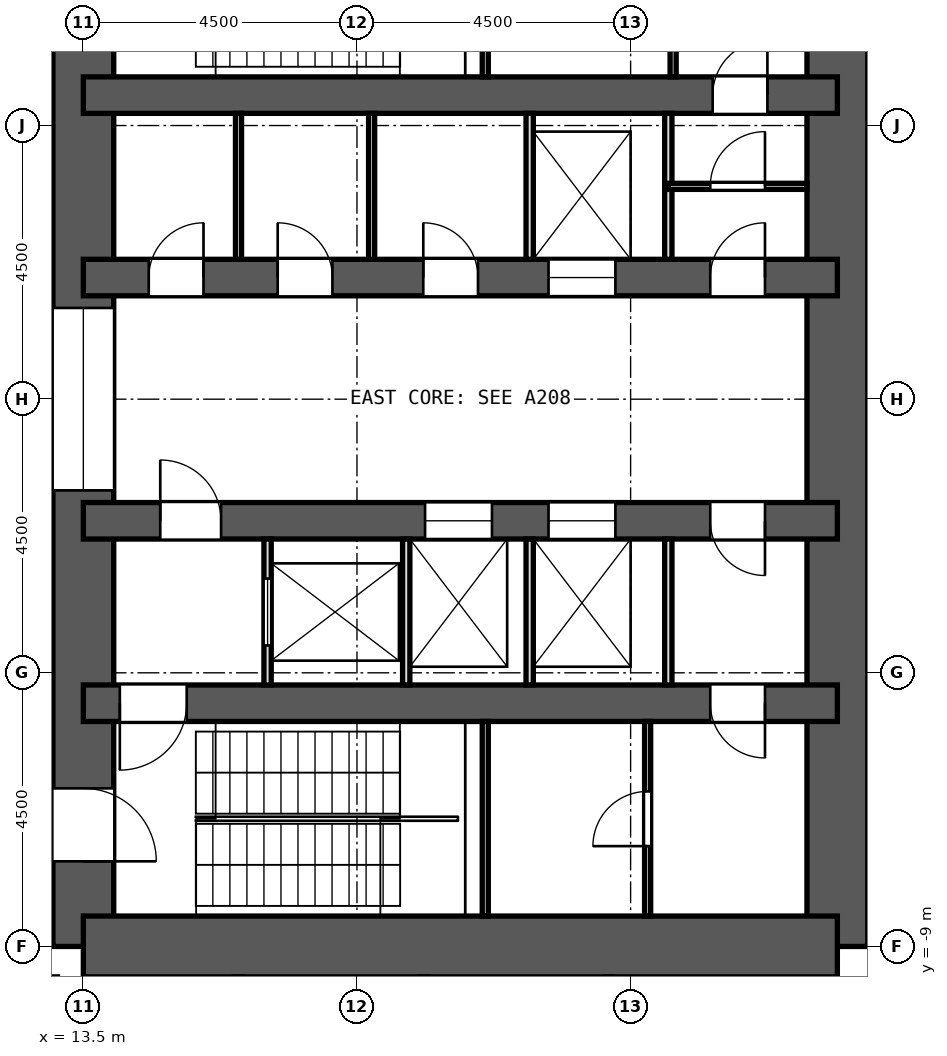
"""IFC4 building model, lengths in metres.
Left out: names, types, materials, properties, quantities, classifications, styles, units other than length and angle.
Written with IfcOpenShell. Run it as: python <this file> out.ifc"""

import sys

from ifc_helpers import new_model, si_unit, direction, frame, frame_2d, origin, place, context, subcontext, project, spatial, rectangle, extrude, element, fill, save


model = new_model("IFC4")
c1 = context("Model", 3, precision=1e-05, world=origin(), true_north=direction((0.0, 1.0)))
c2 = subcontext(c1, "Body", "Model", "MODEL_VIEW")
j1 = project(units=[si_unit("LENGTHUNIT", "METRE"), si_unit("PLANEANGLEUNIT", "RADIAN")], contexts=[c1])
p1 = place(None, origin())
s1 = spatial("IfcSite", under=j1, at=p1, CompositionType="ELEMENT")
p2 = place(p1, origin())
s2 = spatial("IfcBuilding", under=s1, at=p2, CompositionType="ELEMENT")
p3 = place(p2, frame((0.0, 0.0, 21.8)))
s3 = spatial("IfcBuildingStorey", under=s2, at=p3, CompositionType="ELEMENT", Elevation=21.8)
p4 = place(p3, frame((13.5, -9.0, 0.0), z_axis=(0.0, 0.0, 1.0), x_axis=(0.0, 1.0, 0.0)))
e1 = element("IfcWall", 1, at=p4, inside=s3, PredefinedType="SHEAR", context=c2, shape_type="SweptSolid", body=[
    extrude(rectangle(XDim=18.0, YDim=1.0, at=frame_2d((9.0, 0.0))), origin(), (0.0, 0.0, 1.0), 4.5),
])
p5 = place(p4, frame((15.4, 0.0, 0.0)))
e2 = element("IfcOpeningElement", 2, at=p5, cuts=e1, PredefinedType="OPENING", context=c2, shape_type="SweptSolid", body=[
    extrude(rectangle(XDim=1.2, YDim=2.1, at=frame_2d((0.6, 1.05))), frame((0.0, 0.512, 0.0), z_axis=(0.0, -1.0, 0.0), x_axis=(1.0, 0.0, 0.0)), (0.0, 0.0, 1.0), 1.024),
])
p6 = place(p4, frame((1.4, 0.0, 0.0)))
e3 = element("IfcOpeningElement", 3, at=p6, cuts=e1, PredefinedType="OPENING", context=c2, shape_type="SweptSolid", body=[
    extrude(rectangle(XDim=1.2, YDim=2.1, at=frame_2d((0.6, 1.05))), frame((0.0, 0.512, 0.0), z_axis=(0.0, -1.0, 0.0), x_axis=(1.0, 0.0, 0.0)), (0.0, 0.0, 1.0), 1.024),
])
p7 = place(p4, frame((7.5, 0.0, 0.0)))
e4 = element("IfcOpeningElement", 4, at=p7, cuts=e1, PredefinedType="OPENING", context=c2, shape_type="SweptSolid", body=[
    extrude(rectangle(XDim=3.0, YDim=2.4, at=frame_2d((1.5, 1.2))), frame((0.0, 0.512, 0.0), z_axis=(0.0, -1.0, 0.0), x_axis=(1.0, 0.0, 0.0)), (0.0, 0.0, 1.0), 1.024),
])
p8 = place(p3, frame((25.9, -9.0, 0.0), z_axis=(0.0, 0.0, 1.0), x_axis=(0.0, 1.0, 0.0)))
e5 = element("IfcWall", 5, at=p8, inside=s3, PredefinedType="SHEAR", context=c2, shape_type="SweptSolid", body=[
    extrude(rectangle(XDim=18.0, YDim=1.0, at=frame_2d((9.0, 0.0))), origin(), (0.0, 0.0, 1.0), 4.5),
])
p9 = place(p3, frame((13.5, -9.0, 0.0), z_axis=(0.0, 0.0, 1.0), x_axis=(1.0, 0.0, 0.0)))
e6 = element("IfcWall", 6, at=p9, inside=s3, PredefinedType="SHEAR", context=c2, shape_type="SweptSolid", body=[
    extrude(rectangle(XDim=12.4, YDim=1.0, at=frame_2d((6.2, 0.0))), origin(), (0.0, 0.0, 1.0), 4.5),
])
p10 = place(p3, frame((13.5, 5.0, 0.0), z_axis=(0.0, 0.0, 1.0), x_axis=(1.0, 0.0, 0.0)))
e7 = element("IfcWall", 7, at=p10, inside=s3, PredefinedType="SHEAR", context=c2, shape_type="SweptSolid", body=[
    extrude(rectangle(XDim=12.4, YDim=0.6, at=frame_2d((6.2, 0.0))), origin(), (0.0, 0.0, 1.0), 4.5),
])
p11 = place(p10, frame((10.35, 0.0, 0.0)))
e8 = element("IfcOpeningElement", 8, at=p11, cuts=e7, PredefinedType="OPENING", context=c2, shape_type="SweptSolid", body=[
    extrude(rectangle(XDim=0.9, YDim=2.1, at=frame_2d((0.45, 1.05))), frame((0.0, 0.312, 0.0), z_axis=(0.0, -1.0, 0.0), x_axis=(1.0, 0.0, 0.0)), (0.0, 0.0, 1.0), 0.624),
])
p12 = place(p3, frame((13.5, -5.0, 0.0), z_axis=(0.0, 0.0, 1.0), x_axis=(1.0, 0.0, 0.0)))
e9 = element("IfcWall", 9, at=p12, inside=s3, PredefinedType="SHEAR", context=c2, shape_type="SweptSolid", body=[
    extrude(rectangle(XDim=12.4, YDim=0.6, at=frame_2d((6.2, 0.0))), origin(), (0.0, 0.0, 1.0), 4.5),
])
p13 = place(p12, frame((10.31, 0.0, 0.0)))
e10 = element("IfcOpeningElement", 10, at=p13, cuts=e9, PredefinedType="OPENING", context=c2, shape_type="SweptSolid", body=[
    extrude(rectangle(XDim=0.9, YDim=2.1, at=frame_2d((0.45, 1.05))), frame((0.0, 0.312, 0.0), z_axis=(0.0, -1.0, 0.0), x_axis=(1.0, 0.0, 0.0)), (0.0, 0.0, 1.0), 0.624),
])
p14 = place(p12, frame((0.6, 0.0, 0.0)))
e11 = element("IfcOpeningElement", 11, at=p14, cuts=e9, PredefinedType="OPENING", context=c2, shape_type="SweptSolid", body=[
    extrude(rectangle(XDim=1.1, YDim=2.1, at=frame_2d((0.55, 1.05))), frame((0.0, 0.312, 0.0), z_axis=(0.0, -1.0, 0.0), x_axis=(1.0, 0.0, 0.0)), (0.0, 0.0, 1.0), 0.624),
])
p15 = place(p3, frame((13.5, 2.0, 0.0), z_axis=(0.0, 0.0, 1.0), x_axis=(1.0, 0.0, 0.0)))
e12 = element("IfcWall", 12, at=p15, inside=s3, PredefinedType="SHEAR", context=c2, shape_type="SweptSolid", body=[
    extrude(rectangle(XDim=12.4, YDim=0.6, at=frame_2d((6.2, 0.0))), origin(), (0.0, 0.0, 1.0), 4.5),
])
p16 = place(p15, frame((7.65, 0.0, 0.0)))
e13 = element("IfcOpeningElement", 13, at=p16, cuts=e12, PredefinedType="OPENING", context=c2, shape_type="SweptSolid", body=[
    extrude(rectangle(XDim=1.1, YDim=2.1, at=frame_2d((0.55, 1.05))), frame((0.0, 0.312, 0.0), z_axis=(0.0, -1.0, 0.0), x_axis=(1.0, 0.0, 0.0)), (0.0, 0.0, 1.0), 0.624),
])
p17 = place(p15, frame((1.076, 0.0, 0.0)))
e14 = element("IfcOpeningElement", 14, at=p17, cuts=e12, PredefinedType="OPENING", context=c2, shape_type="SweptSolid", body=[
    extrude(rectangle(XDim=0.9, YDim=2.1, at=frame_2d((0.45, 1.05))), frame((0.0, 0.312, 0.0), z_axis=(0.0, -1.0, 0.0), x_axis=(1.0, 0.0, 0.0)), (0.0, 0.0, 1.0), 0.624),
])
p18 = place(p15, frame((3.196, 0.0, 0.0)))
e15 = element("IfcOpeningElement", 15, at=p18, cuts=e12, PredefinedType="OPENING", context=c2, shape_type="SweptSolid", body=[
    extrude(rectangle(XDim=0.9, YDim=2.1, at=frame_2d((0.45, 1.05))), frame((0.0, 0.312, 0.0), z_axis=(0.0, -1.0, 0.0), x_axis=(1.0, 0.0, 0.0)), (0.0, 0.0, 1.0), 0.624),
])
p19 = place(p15, frame((5.59, 0.0, 0.0)))
e16 = element("IfcOpeningElement", 16, at=p19, cuts=e12, PredefinedType="OPENING", context=c2, shape_type="SweptSolid", body=[
    extrude(rectangle(XDim=0.9, YDim=2.1, at=frame_2d((0.45, 1.05))), frame((0.0, 0.312, 0.0), z_axis=(0.0, -1.0, 0.0), x_axis=(1.0, 0.0, 0.0)), (0.0, 0.0, 1.0), 0.624),
])
p20 = place(p15, frame((10.31, 0.0, 0.0)))
e17 = element("IfcOpeningElement", 17, at=p20, cuts=e12, PredefinedType="OPENING", context=c2, shape_type="SweptSolid", body=[
    extrude(rectangle(XDim=0.9, YDim=2.1, at=frame_2d((0.45, 1.05))), frame((0.0, 0.312, 0.0), z_axis=(0.0, -1.0, 0.0), x_axis=(1.0, 0.0, 0.0)), (0.0, 0.0, 1.0), 0.624),
])
p21 = place(p3, frame((13.5, -2.0, 0.0), z_axis=(0.0, 0.0, 1.0), x_axis=(1.0, 0.0, 0.0)))
e18 = element("IfcWall", 18, at=p21, inside=s3, PredefinedType="SHEAR", context=c2, shape_type="SweptSolid", body=[
    extrude(rectangle(XDim=12.4, YDim=0.6, at=frame_2d((6.2, 0.0))), origin(), (0.0, 0.0, 1.0), 4.5),
])
p22 = place(p21, frame((5.62, 0.0, 0.0)))
e19 = element("IfcOpeningElement", 19, at=p22, cuts=e18, PredefinedType="OPENING", context=c2, shape_type="SweptSolid", body=[
    extrude(rectangle(XDim=1.1, YDim=2.1, at=frame_2d((0.55, 1.05))), frame((0.0, 0.312, 0.0), z_axis=(0.0, -1.0, 0.0), x_axis=(1.0, 0.0, 0.0)), (0.0, 0.0, 1.0), 0.624),
])
p23 = place(p21, frame((7.65, 0.0, 0.0)))
e20 = element("IfcOpeningElement", 20, at=p23, cuts=e18, PredefinedType="OPENING", context=c2, shape_type="SweptSolid", body=[
    extrude(rectangle(XDim=1.1, YDim=2.1, at=frame_2d((0.55, 1.05))), frame((0.0, 0.312, 0.0), z_axis=(0.0, -1.0, 0.0), x_axis=(1.0, 0.0, 0.0)), (0.0, 0.0, 1.0), 0.624),
])
p24 = place(p21, frame((1.265, 0.0, 0.0)))
e21 = element("IfcOpeningElement", 21, at=p24, cuts=e18, PredefinedType="OPENING", context=c2, shape_type="SweptSolid", body=[
    extrude(rectangle(XDim=1.0, YDim=2.1, at=frame_2d((0.5, 1.05))), frame((0.0, 0.312, 0.0), z_axis=(0.0, -1.0, 0.0), x_axis=(1.0, 0.0, 0.0)), (0.0, 0.0, 1.0), 0.624),
])
p25 = place(p21, frame((10.31, 0.0, 0.0)))
e22 = element("IfcOpeningElement", 22, at=p25, cuts=e18, PredefinedType="OPENING", context=c2, shape_type="SweptSolid", body=[
    extrude(rectangle(XDim=0.9, YDim=2.1, at=frame_2d((0.45, 1.05))), frame((0.0, 0.312, 0.0), z_axis=(0.0, -1.0, 0.0), x_axis=(1.0, 0.0, 0.0)), (0.0, 0.0, 1.0), 0.624),
])
p26 = place(p3, frame((26.328, -11.255, 0.0), z_axis=(0.0, 0.0, 1.0), x_axis=(0.342034744565, 0.939687306241, 0.0)))
e23 = element("IfcWall", 23, at=p26, inside=s3, PredefinedType="SOLIDWALL", context=c2, shape_type="SweptSolid", body=[
    extrude(rectangle(XDim=4.099, YDim=0.6, at=frame_2d((2.05, 0.0))), origin(), (0.0, 0.0, 1.0), 2.15),
])
for number, where, z_axis, x_axis in (
    (24, (16.052, 2.3, 0.0), (0.0, 0.0, 1.0), (0.0, 1.0, 0.0)),
    (25, (18.241, 2.3, 0.0), (0.0, 0.0, 1.0), (0.0, 1.0, 0.0)),
):
    element("IfcWall", number, at=place(p3, frame(where, z_axis=z_axis, x_axis=x_axis)), inside=s3, PredefinedType="PARTITIONING", context=c2, shape_type="SweptSolid", body=[
        extrude(rectangle(XDim=2.4, YDim=0.1, at=frame_2d((1.2, 0.0))), origin(), (0.0, 0.0, 1.0), 3.95),
    ])
for number, where, z_axis, x_axis in (
    (26, (20.84, 2.3, 0.0), (0.0, 0.0, 1.0), (0.0, 1.0, 0.0)),
    (27, (23.12, 2.3, 0.0), (0.0, 0.0, 1.0), (0.0, 1.0, 0.0)),
):
    element("IfcWall", number, at=place(p3, frame(where, z_axis=z_axis, x_axis=x_axis)), inside=s3, PredefinedType="PARTITIONING", context=c2, shape_type="SweptSolid", body=[
        extrude(rectangle(XDim=2.4, YDim=0.12, at=frame_2d((1.2, 0.0))), origin(), (0.0, 0.0, 1.0), 3.95),
    ])
p27 = place(p3, frame((16.53, -4.7, 0.0), z_axis=(0.0, 0.0, 1.0), x_axis=(0.0, 1.0, 0.0)))
e28 = element("IfcWall", 28, at=p27, inside=s3, PredefinedType="PARTITIONING", context=c2, shape_type="SweptSolid", body=[
    extrude(rectangle(XDim=2.4, YDim=0.12, at=frame_2d((1.2, 0.0))), origin(), (0.0, 0.0, 1.0), 3.95),
])
p28 = place(p27, frame((0.65, 0.0, 0.0)))
e29 = element("IfcOpeningElement", 29, at=p28, cuts=e28, PredefinedType="OPENING", context=c2, shape_type="SweptSolid", body=[
    extrude(rectangle(XDim=1.1, YDim=2.1, at=frame_2d((0.55, 1.05))), frame((0.0, 0.072, 0.0), z_axis=(0.0, -1.0, 0.0), x_axis=(1.0, 0.0, 0.0)), (0.0, 0.0, 1.0), 0.144),
])
for number, where, z_axis, x_axis in (
    (30, (18.81, -4.7, 0.0), (0.0, 0.0, 1.0), (0.0, 1.0, 0.0)),
    (31, (20.84, -4.7, 0.0), (0.0, 0.0, 1.0), (0.0, 1.0, 0.0)),
    (32, (23.12, -4.7, 0.0), (0.0, 0.0, 1.0), (0.0, 1.0, 0.0)),
):
    element("IfcWall", number, at=place(p3, frame(where, z_axis=z_axis, x_axis=x_axis)), inside=s3, PredefinedType="PARTITIONING", context=c2, shape_type="SweptSolid", body=[
        extrude(rectangle(XDim=2.4, YDim=0.12, at=frame_2d((1.2, 0.0))), origin(), (0.0, 0.0, 1.0), 3.95),
    ])
p29 = place(p3, frame((23.12, 3.5, 0.0), z_axis=(0.0, 0.0, 1.0), x_axis=(1.0, 0.0, 0.0)))
e33 = element("IfcWall", 33, at=p29, inside=s3, PredefinedType="PARTITIONING", context=c2, shape_type="SweptSolid", body=[
    extrude(rectangle(XDim=2.28, YDim=0.1, at=frame_2d((1.14, 0.0))), origin(), (0.0, 0.0, 1.0), 3.95),
])
p30 = place(p29, frame((0.69, 0.0, 0.0)))
e34 = element("IfcOpeningElement", 34, at=p30, cuts=e33, PredefinedType="OPENING", context=c2, shape_type="SweptSolid", body=[
    extrude(rectangle(XDim=0.9, YDim=2.1, at=frame_2d((0.45, 1.05))), frame((0.0, 0.062, 0.0), z_axis=(0.0, -1.0, 0.0), x_axis=(1.0, 0.0, 0.0)), (0.0, 0.0, 1.0), 0.124),
])
p31 = place(p3, frame((20.11, 5.3, 0.0), z_axis=(0.0, 0.0, 1.0), x_axis=(0.0, 1.0, 0.0)))
e35 = element("IfcWall", 35, at=p31, inside=s3, PredefinedType="PARTITIONING", context=c2, shape_type="SweptSolid", body=[
    extrude(rectangle(XDim=3.2, YDim=0.1, at=frame_2d((1.6, 0.0))), origin(), (0.0, 0.0, 1.0), 3.95),
])
p32 = place(p3, frame((23.199, 5.3, 0.0), z_axis=(0.0, 0.0, 1.0), x_axis=(0.0, 1.0, 0.0)))
e36 = element("IfcWall", 36, at=p32, inside=s3, PredefinedType="PARTITIONING", context=c2, shape_type="SweptSolid", body=[
    extrude(rectangle(XDim=3.2, YDim=0.1, at=frame_2d((1.6, 0.0))), origin(), (0.0, 0.0, 1.0), 3.95),
])
p33 = place(p32, frame((1.15, 0.0, 0.0)))
e37 = element("IfcOpeningElement", 37, at=p33, cuts=e36, PredefinedType="OPENING", context=c2, shape_type="SweptSolid", body=[
    extrude(rectangle(XDim=0.9, YDim=2.1, at=frame_2d((0.45, 1.05))), frame((0.0, 0.062, 0.0), z_axis=(0.0, -1.0, 0.0), x_axis=(1.0, 0.0, 0.0)), (0.0, 0.0, 1.0), 0.124),
])
p34 = place(p3, frame((20.11, -8.5, 0.0), z_axis=(0.0, 0.0, 1.0), x_axis=(0.0, 1.0, 0.0)))
e38 = element("IfcWall", 38, at=p34, inside=s3, PredefinedType="PARTITIONING", context=c2, shape_type="SweptSolid", body=[
    extrude(rectangle(XDim=3.2, YDim=0.1, at=frame_2d((1.6, 0.0))), origin(), (0.0, 0.0, 1.0), 3.95),
])
p35 = place(p3, frame((22.78, -8.5, 0.0), z_axis=(0.0, 0.0, 1.0), x_axis=(0.0, 1.0, 0.0)))
e39 = element("IfcWall", 39, at=p35, inside=s3, PredefinedType="PARTITIONING", context=c2, shape_type="SweptSolid", body=[
    extrude(rectangle(XDim=3.2, YDim=0.1, at=frame_2d((1.6, 0.0))), origin(), (0.0, 0.0, 1.0), 3.95),
])
p36 = place(p35, frame((1.15, 0.0, 0.0)))
e40 = element("IfcOpeningElement", 40, at=p36, cuts=e39, PredefinedType="OPENING", context=c2, shape_type="SweptSolid", body=[
    extrude(rectangle(XDim=0.9, YDim=2.1, at=frame_2d((0.45, 1.05))), frame((0.0, 0.062, 0.0), z_axis=(0.0, -1.0, 0.0), x_axis=(1.0, 0.0, 0.0)), (0.0, 0.0, 1.0), 0.124),
])
p37 = place(p16, origin())
e41 = element("IfcDoor", 41, at=p37, inside=s3, OperationType="DOUBLE_DOOR_SLIDING", PredefinedType="DOOR", context=c2, shape_type="SweptSolid", body=[
    extrude(rectangle(XDim=1.1, YDim=2.1, at=frame_2d((0.55, 1.05))), frame((0.0, 0.025, 0.0), z_axis=(0.0, -1.0, 0.0), x_axis=(1.0, 0.0, 0.0)), (0.0, 0.0, 1.0), 0.05),
])
fill(e13, e41)
p38 = place(p28, origin())
e42 = element("IfcDoor", 42, at=p38, inside=s3, OperationType="DOUBLE_DOOR_SLIDING", PredefinedType="DOOR", context=c2, shape_type="SweptSolid", body=[
    extrude(rectangle(XDim=1.1, YDim=2.1, at=frame_2d((0.55, 1.05))), frame((0.0, 0.025, 0.0), z_axis=(0.0, -1.0, 0.0), x_axis=(1.0, 0.0, 0.0)), (0.0, 0.0, 1.0), 0.05),
])
fill(e29, e42)
p39 = place(p22, origin())
e43 = element("IfcDoor", 43, at=p39, inside=s3, OperationType="DOUBLE_DOOR_SLIDING", PredefinedType="DOOR", context=c2, shape_type="SweptSolid", body=[
    extrude(rectangle(XDim=1.1, YDim=2.1, at=frame_2d((0.55, 1.05))), frame((0.0, 0.025, 0.0), z_axis=(0.0, -1.0, 0.0), x_axis=(1.0, 0.0, 0.0)), (0.0, 0.0, 1.0), 0.05),
])
fill(e19, e43)
p40 = place(p23, origin())
e44 = element("IfcDoor", 44, at=p40, inside=s3, OperationType="DOUBLE_DOOR_SLIDING", PredefinedType="DOOR", context=c2, shape_type="SweptSolid", body=[
    extrude(rectangle(XDim=1.1, YDim=2.1, at=frame_2d((0.55, 1.05))), frame((0.0, 0.025, 0.0), z_axis=(0.0, -1.0, 0.0), x_axis=(1.0, 0.0, 0.0)), (0.0, 0.0, 1.0), 0.05),
])
fill(e20, e44)
p41 = place(p17, origin())
e45 = element("IfcDoor", 45, at=p41, inside=s3, OperationType="SINGLE_SWING_RIGHT", PredefinedType="DOOR", context=c2, shape_type="SweptSolid", body=[
    extrude(rectangle(XDim=0.9, YDim=2.1, at=frame_2d((0.45, 1.05))), frame((0.0, 0.025, 0.0), z_axis=(0.0, -1.0, 0.0), x_axis=(1.0, 0.0, 0.0)), (0.0, 0.0, 1.0), 0.05),
])
fill(e14, e45)
p42 = place(p18, origin())
e46 = element("IfcDoor", 46, at=p42, inside=s3, OperationType="SINGLE_SWING_LEFT", PredefinedType="DOOR", context=c2, shape_type="SweptSolid", body=[
    extrude(rectangle(XDim=0.9, YDim=2.1, at=frame_2d((0.45, 1.05))), frame((0.0, 0.025, 0.0), z_axis=(0.0, -1.0, 0.0), x_axis=(1.0, 0.0, 0.0)), (0.0, 0.0, 1.0), 0.05),
])
fill(e15, e46)
p43 = place(p19, origin())
e47 = element("IfcDoor", 47, at=p43, inside=s3, OperationType="SINGLE_SWING_LEFT", PredefinedType="DOOR", context=c2, shape_type="SweptSolid", body=[
    extrude(rectangle(XDim=0.9, YDim=2.1, at=frame_2d((0.45, 1.05))), frame((0.0, 0.025, 0.0), z_axis=(0.0, -1.0, 0.0), x_axis=(1.0, 0.0, 0.0)), (0.0, 0.0, 1.0), 0.05),
])
fill(e16, e47)
p44 = place(p20, origin())
e48 = element("IfcDoor", 48, at=p44, inside=s3, OperationType="SINGLE_SWING_RIGHT", PredefinedType="DOOR", context=c2, shape_type="SweptSolid", body=[
    extrude(rectangle(XDim=0.9, YDim=2.1, at=frame_2d((0.45, 1.05))), frame((0.0, 0.025, 0.0), z_axis=(0.0, -1.0, 0.0), x_axis=(1.0, 0.0, 0.0)), (0.0, 0.0, 1.0), 0.05),
])
fill(e17, e48)
p45 = place(p24, origin())
e49 = element("IfcDoor", 49, at=p45, inside=s3, OperationType="SINGLE_SWING_LEFT", PredefinedType="DOOR", context=c2, shape_type="SweptSolid", body=[
    extrude(rectangle(XDim=1.0, YDim=2.1, at=frame_2d((0.5, 1.05))), frame((0.0, 0.025, 0.0), z_axis=(0.0, -1.0, 0.0), x_axis=(1.0, 0.0, 0.0)), (0.0, 0.0, 1.0), 0.05),
])
fill(e21, e49)
p46 = place(p25, frame((0.9, 0.0, 0.0), z_axis=(0.0, 0.0, 1.0), x_axis=(-1.0, 0.0, 0.0)))
e50 = element("IfcDoor", 50, at=p46, inside=s3, OperationType="SINGLE_SWING_LEFT", PredefinedType="DOOR", context=c2, shape_type="SweptSolid", body=[
    extrude(rectangle(XDim=0.9, YDim=2.1, at=frame_2d((0.45, 1.05))), frame((0.0, 0.025, 0.0), z_axis=(0.0, -1.0, 0.0), x_axis=(1.0, 0.0, 0.0)), (0.0, 0.0, 1.0), 0.05),
])
fill(e22, e50)
p47 = place(p30, origin())
e51 = element("IfcDoor", 51, at=p47, inside=s3, OperationType="SINGLE_SWING_RIGHT", PredefinedType="DOOR", context=c2, shape_type="SweptSolid", body=[
    extrude(rectangle(XDim=0.9, YDim=2.1, at=frame_2d((0.45, 1.05))), frame((0.0, 0.025, 0.0), z_axis=(0.0, -1.0, 0.0), x_axis=(1.0, 0.0, 0.0)), (0.0, 0.0, 1.0), 0.05),
])
fill(e34, e51)
p48 = place(p11, origin())
e52 = element("IfcDoor", 52, at=p48, inside=s3, OperationType="SINGLE_SWING_RIGHT", PredefinedType="DOOR", context=c2, shape_type="SweptSolid", body=[
    extrude(rectangle(XDim=0.9, YDim=2.1, at=frame_2d((0.45, 1.05))), frame((0.0, 0.025, 0.0), z_axis=(0.0, -1.0, 0.0), x_axis=(1.0, 0.0, 0.0)), (0.0, 0.0, 1.0), 0.05),
])
fill(e8, e52)
p49 = place(p36, origin())
e53 = element("IfcDoor", 53, at=p49, inside=s3, OperationType="SINGLE_SWING_LEFT", PredefinedType="DOOR", context=c2, shape_type="SweptSolid", body=[
    extrude(rectangle(XDim=0.9, YDim=2.1, at=frame_2d((0.45, 1.05))), frame((0.0, 0.025, 0.0), z_axis=(0.0, -1.0, 0.0), x_axis=(1.0, 0.0, 0.0)), (0.0, 0.0, 1.0), 0.05),
])
fill(e40, e53)
p50 = place(p13, frame((0.9, 0.0, 0.0), z_axis=(0.0, 0.0, 1.0), x_axis=(-1.0, 0.0, 0.0)))
e54 = element("IfcDoor", 54, at=p50, inside=s3, OperationType="SINGLE_SWING_LEFT", PredefinedType="DOOR", context=c2, shape_type="SweptSolid", body=[
    extrude(rectangle(XDim=0.9, YDim=2.1, at=frame_2d((0.45, 1.05))), frame((0.0, 0.025, 0.0), z_axis=(0.0, -1.0, 0.0), x_axis=(1.0, 0.0, 0.0)), (0.0, 0.0, 1.0), 0.05),
])
fill(e10, e54)
p51 = place(p14, frame((1.1, 0.0, 0.0), z_axis=(0.0, 0.0, 1.0), x_axis=(-1.0, 0.0, 0.0)))
e55 = element("IfcDoor", 55, at=p51, inside=s3, OperationType="SINGLE_SWING_RIGHT", PredefinedType="DOOR", context=c2, shape_type="SweptSolid", body=[
    extrude(rectangle(XDim=1.1, YDim=2.1, at=frame_2d((0.55, 1.05))), frame((0.0, 0.025, 0.0), z_axis=(0.0, -1.0, 0.0), x_axis=(1.0, 0.0, 0.0)), (0.0, 0.0, 1.0), 0.05),
])
fill(e11, e55)
p52 = place(p6, frame((1.2, 0.0, 0.0), z_axis=(0.0, 0.0, 1.0), x_axis=(-1.0, 0.0, 0.0)))
e56 = element("IfcDoor", 56, at=p52, inside=s3, OperationType="SINGLE_SWING_RIGHT", PredefinedType="DOOR", context=c2, shape_type="SweptSolid", body=[
    extrude(rectangle(XDim=1.2, YDim=2.1, at=frame_2d((0.6, 1.05))), frame((0.0, 0.025, 0.0), z_axis=(0.0, -1.0, 0.0), x_axis=(1.0, 0.0, 0.0)), (0.0, 0.0, 1.0), 0.05),
])
fill(e3, e56)
p53 = place(p7, origin())
e57 = element("IfcDoor", 57, at=p53, inside=s3, OperationType="DOUBLE_DOOR_SLIDING", PredefinedType="DOOR", context=c2, shape_type="SweptSolid", body=[
    extrude(rectangle(XDim=3.0, YDim=2.4, at=frame_2d((1.5, 1.2))), frame((0.0, 0.025, 0.0), z_axis=(0.0, -1.0, 0.0), x_axis=(1.0, 0.0, 0.0)), (0.0, 0.0, 1.0), 0.05),
])
fill(e4, e57)
save(model, sys.argv[1])
